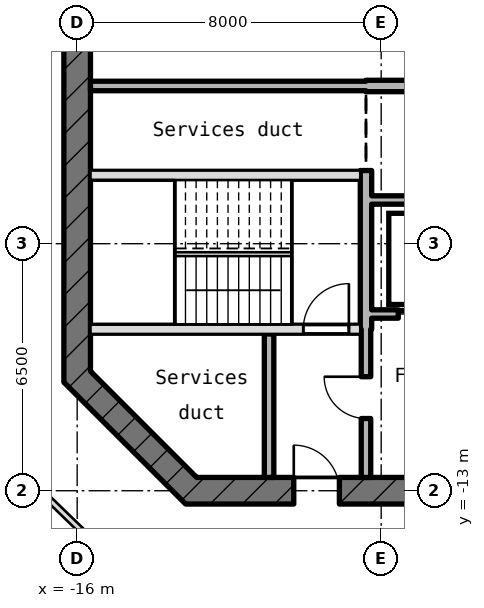
"""IFC4 building model, lengths in metres.
Left out: names, types, materials, properties, quantities, classifications, styles, units other than length and angle.
Written with IfcOpenShell. Run it as: python <this file> out.ifc"""

import sys

from ifc_helpers import new_model, si_unit, direction, frame, frame_2d, origin, place, context, subcontext, project, spatial, rectangle, extrude, element, fill, save


model = new_model("IFC4")
c1 = context("Model", 3, precision=1e-05, world=origin(), true_north=direction((0.0, 1.0)))
c2 = subcontext(c1, "Body", "Model", "MODEL_VIEW")
j1 = project(units=[si_unit("LENGTHUNIT", "METRE"), si_unit("PLANEANGLEUNIT", "RADIAN")], contexts=[c1])
p1 = place(None, origin())
s1 = spatial("IfcSite", under=j1, at=p1, CompositionType="ELEMENT")
p2 = place(p1, origin())
s2 = spatial("IfcBuilding", under=s1, at=p2, CompositionType="ELEMENT")
p3 = place(p2, frame((0.0, 0.0, 346.75)))
s3 = spatial("IfcBuildingStorey", under=s2, at=p3, CompositionType="ELEMENT", Elevation=346.75)
p4 = place(p3, frame((-16.0, 10.145, -0.18), z_axis=(0.0, 0.0, 1.0), x_axis=(0.0, -1.0, 0.0)))
e1 = element("IfcWall", 1, at=p4, inside=s3, PredefinedType="SHEAR", context=c2, shape_type="SweptSolid", body=[
    extrude(rectangle(XDim=20.29, YDim=0.7, at=frame_2d((10.145, 0.0))), origin(), (0.0, 0.0, 1.0), 4.15),
])
p5 = place(p4, frame((8.945, 0.0, 0.18)))
e2 = element("IfcOpeningElement", 2, at=p5, cuts=e1, PredefinedType="OPENING", context=c2, shape_type="SweptSolid", body=[
    extrude(rectangle(XDim=2.4, YDim=2.1, at=frame_2d((1.2, 1.05))), frame((0.0, 0.36, 0.0), z_axis=(0.0, -1.0, 0.0), x_axis=(1.0, 0.0, 0.0)), (0.0, 0.0, 1.0), 0.72),
])
p6 = place(p4, frame((5.545, 0.0, 0.18)))
e3 = element("IfcOpeningElement", 3, at=p6, cuts=e1, PredefinedType="OPENING", context=c2, shape_type="SweptSolid", body=[
    extrude(rectangle(XDim=1.2, YDim=2.1, at=frame_2d((0.6, 1.05))), frame((0.0, 0.36, 0.0), z_axis=(0.0, -1.0, 0.0), x_axis=(1.0, 0.0, 0.0)), (0.0, 0.0, 1.0), 0.72),
])
p7 = place(p3, frame((-16.103, -9.897, -0.18), z_axis=(0.0, 0.0, 1.0), x_axis=(0.707106781187, -0.707106781187, 0.0)))
e4 = element("IfcWall", 4, at=p7, inside=s3, PredefinedType="SHEAR", context=c2, shape_type="SweptSolid", body=[
    extrude(rectangle(XDim=4.533, YDim=0.7, at=frame_2d((2.266, 0.0))), origin(), (0.0, 0.0, 1.0), 4.15),
])
p8 = place(p3, frame((-13.145, -13.0, -0.18), z_axis=(0.0, 0.0, 1.0), x_axis=(1.0, 0.0, 0.0)))
e5 = element("IfcWall", 5, at=p8, inside=s3, PredefinedType="SHEAR", context=c2, shape_type="SweptSolid", body=[
    extrude(rectangle(XDim=26.29, YDim=0.7, at=frame_2d((13.145, 0.0))), origin(), (0.0, 0.0, 1.0), 4.15),
])
p9 = place(p8, frame((2.845, 0.0, 0.18)))
e6 = element("IfcOpeningElement", 6, at=p9, cuts=e5, PredefinedType="OPENING", context=c2, shape_type="SweptSolid", body=[
    extrude(rectangle(XDim=1.2, YDim=2.1, at=frame_2d((0.6, 1.05))), frame((0.0, 0.36, 0.0), z_axis=(0.0, -1.0, 0.0), x_axis=(1.0, 0.0, 0.0)), (0.0, 0.0, 1.0), 0.72),
])
p10 = place(p8, frame((6.845, 0.0, 0.18)))
e7 = element("IfcOpeningElement", 7, at=p10, cuts=e5, PredefinedType="OPENING", context=c2, shape_type="SweptSolid", body=[
    extrude(rectangle(XDim=1.4, YDim=2.1, at=frame_2d((0.7, 1.05))), frame((0.0, 0.36, 0.0), z_axis=(0.0, -1.0, 0.0), x_axis=(1.0, 0.0, 0.0)), (0.0, 0.0, 1.0), 0.72),
])
p11 = place(p8, frame((15.445, 0.0, 0.18)))
e8 = element("IfcOpeningElement", 8, at=p11, cuts=e5, PredefinedType="OPENING", context=c2, shape_type="SweptSolid", body=[
    extrude(rectangle(XDim=1.4, YDim=2.1, at=frame_2d((0.7, 1.05))), frame((0.0, 0.36, 0.0), z_axis=(0.0, -1.0, 0.0), x_axis=(1.0, 0.0, 0.0)), (0.0, 0.0, 1.0), 0.72),
])
p12 = place(p3, frame((-15.65, -8.75, -0.18), z_axis=(0.0, 0.0, 1.0), x_axis=(1.0, 0.0, 0.0)))
e9 = element("IfcWall", 9, at=p12, inside=s3, PredefinedType="SHEAR", context=c2, shape_type="SweptSolid", body=[
    extrude(rectangle(XDim=7.1, YDim=0.25, at=frame_2d((3.55, 0.0))), origin(), (0.0, 0.0, 1.0), 4.15),
])
p13 = place(p12, frame((5.6, 0.0, 0.18)))
e10 = element("IfcOpeningElement", 10, at=p13, cuts=e9, PredefinedType="OPENING", context=c2, shape_type="SweptSolid", body=[
    extrude(rectangle(XDim=1.2, YDim=2.1, at=frame_2d((0.6, 1.05))), frame((0.0, 0.135, 0.0), z_axis=(0.0, -1.0, 0.0), x_axis=(1.0, 0.0, 0.0)), (0.0, 0.0, 1.0), 0.27),
])
p14 = place(p3, frame((-8.25, -8.35, 0.0), z_axis=(0.0, 0.0, 1.0), x_axis=(1.0, 0.0, 0.0)))
e11 = element("IfcWall", 11, at=p14, inside=s3, PredefinedType="STANDARD", context=c2, shape_type="SweptSolid", body=[
    extrude(rectangle(XDim=5.34, YDim=0.22, at=frame_2d((2.67, 0.0))), origin(), (0.0, 0.0, 1.0), 3.97),
])
p15 = place(p14, frame((0.7, 0.0, 0.0)))
e12 = element("IfcOpeningElement", 12, at=p15, cuts=e11, PredefinedType="OPENING", context=c2, shape_type="SweptSolid", body=[
    extrude(rectangle(XDim=1.1, YDim=2.1, at=frame_2d((0.55, 1.05))), frame((0.0, 0.12, 0.0), z_axis=(0.0, -1.0, 0.0), x_axis=(1.0, 0.0, 0.0)), (0.0, 0.0, 1.0), 0.24),
])
p16 = place(p14, frame((3.5, 0.0, 0.0)))
e13 = element("IfcOpeningElement", 13, at=p16, cuts=e11, PredefinedType="OPENING", context=c2, shape_type="SweptSolid", body=[
    extrude(rectangle(XDim=1.1, YDim=2.1, at=frame_2d((0.55, 1.05))), frame((0.0, 0.12, 0.0), z_axis=(0.0, -1.0, 0.0), x_axis=(1.0, 0.0, 0.0)), (0.0, 0.0, 1.0), 0.24),
])
p17 = place(p3, frame((-8.25, -5.35, 0.0), z_axis=(0.0, 0.0, 1.0), x_axis=(1.0, 0.0, 0.0)))
e14 = element("IfcWall", 14, at=p17, inside=s3, PredefinedType="STANDARD", context=c2, shape_type="SweptSolid", body=[
    extrude(rectangle(XDim=16.5, YDim=0.22, at=frame_2d((8.25, 0.0))), origin(), (0.0, 0.0, 1.0), 3.97),
])
p18 = place(p3, frame((-15.65, -4.7, -0.18), z_axis=(0.0, 0.0, 1.0), x_axis=(1.0, 0.0, 0.0)))
e15 = element("IfcWall", 15, at=p18, inside=s3, PredefinedType="SHEAR", context=c2, shape_type="SweptSolid", body=[
    extrude(rectangle(XDim=7.1, YDim=0.25, at=frame_2d((3.55, 0.0))), origin(), (0.0, 0.0, 1.0), 4.15),
])
p19 = place(p3, frame((-15.65, -2.35, 0.0), z_axis=(0.0, 0.0, 1.0), x_axis=(1.0, 0.0, 0.0)))
e16 = element("IfcWall", 16, at=p19, inside=s3, PredefinedType="STANDARD", context=c2, shape_type="SweptSolid", body=[
    extrude(rectangle(XDim=7.25, YDim=0.25, at=frame_2d((3.625, 0.0))), origin(), (0.0, 0.0, 1.0), 3.97),
])
p20 = place(p3, frame((-8.4, -2.35, -0.18), z_axis=(0.0, 0.0, 1.0), x_axis=(1.0, 0.0, 0.0)))
e17 = element("IfcWall", 17, at=p20, inside=s3, PredefinedType="SHEAR", context=c2, shape_type="SweptSolid", body=[
    extrude(rectangle(XDim=16.8, YDim=0.3, at=frame_2d((8.4, 0.0))), origin(), (0.0, 0.0, 1.0), 4.15),
])
p21 = place(p20, frame((2.2, 0.0, 0.18)))
e18 = element("IfcOpeningElement", 18, at=p21, cuts=e17, PredefinedType="OPENING", context=c2, shape_type="SweptSolid", body=[
    extrude(rectangle(XDim=1.2, YDim=2.1, at=frame_2d((0.6, 1.05))), frame((0.0, 0.16, 0.0), z_axis=(0.0, -1.0, 0.0), x_axis=(1.0, 0.0, 0.0)), (0.0, 0.0, 1.0), 0.32),
])
p22 = place(p20, frame((5.0, 0.0, 0.18)))
e19 = element("IfcOpeningElement", 19, at=p22, cuts=e17, PredefinedType="OPENING", context=c2, shape_type="SweptSolid", body=[
    extrude(rectangle(XDim=1.2, YDim=2.1, at=frame_2d((0.6, 1.05))), frame((0.0, 0.16, 0.0), z_axis=(0.0, -1.0, 0.0), x_axis=(1.0, 0.0, 0.0)), (0.0, 0.0, 1.0), 0.32),
])
p23 = place(p20, frame((7.8, 0.0, 0.18)))
e20 = element("IfcOpeningElement", 20, at=p23, cuts=e17, PredefinedType="OPENING", context=c2, shape_type="SweptSolid", body=[
    extrude(rectangle(XDim=1.2, YDim=2.1, at=frame_2d((0.6, 1.05))), frame((0.0, 0.16, 0.0), z_axis=(0.0, -1.0, 0.0), x_axis=(1.0, 0.0, 0.0)), (0.0, 0.0, 1.0), 0.32),
])
p24 = place(p20, frame((10.6, 0.0, 0.18)))
e21 = element("IfcOpeningElement", 21, at=p24, cuts=e17, PredefinedType="OPENING", context=c2, shape_type="SweptSolid", body=[
    extrude(rectangle(XDim=1.2, YDim=2.1, at=frame_2d((0.6, 1.05))), frame((0.0, 0.16, 0.0), z_axis=(0.0, -1.0, 0.0), x_axis=(1.0, 0.0, 0.0)), (0.0, 0.0, 1.0), 0.32),
])
p25 = place(p20, frame((13.4, 0.0, 0.18)))
e22 = element("IfcOpeningElement", 22, at=p25, cuts=e17, PredefinedType="OPENING", context=c2, shape_type="SweptSolid", body=[
    extrude(rectangle(XDim=1.2, YDim=2.1, at=frame_2d((0.6, 1.05))), frame((0.0, 0.16, 0.0), z_axis=(0.0, -1.0, 0.0), x_axis=(1.0, 0.0, 0.0)), (0.0, 0.0, 1.0), 0.32),
])
p26 = place(p3, frame((-10.95, -12.65, 0.0), z_axis=(0.0, 0.0, 1.0), x_axis=(0.0, 1.0, 0.0)))
e23 = element("IfcWall", 23, at=p26, inside=s3, PredefinedType="STANDARD", context=c2, shape_type="SweptSolid", body=[
    extrude(rectangle(XDim=3.775, YDim=0.25, at=frame_2d((1.887, 0.0))), origin(), (0.0, 0.0, 1.0), 3.97),
])
p27 = place(p3, frame((-8.4, -12.65, 0.0), z_axis=(0.0, 0.0, 1.0), x_axis=(0.0, 1.0, 0.0)))
e24 = element("IfcWall", 24, at=p27, inside=s3, PredefinedType="STANDARD", context=c2, shape_type="SweptSolid", body=[
    extrude(rectangle(XDim=3.9, YDim=0.25, at=frame_2d((1.95, 0.0))), origin(), (0.0, 0.0, 1.0), 3.97),
])
p28 = place(p27, frame((1.55, 0.0, 0.0)))
e25 = element("IfcOpeningElement", 25, at=p28, cuts=e24, PredefinedType="OPENING", context=c2, shape_type="SweptSolid", body=[
    extrude(rectangle(XDim=1.1, YDim=2.1, at=frame_2d((0.55, 1.05))), frame((0.0, 0.135, 0.0), z_axis=(0.0, -1.0, 0.0), x_axis=(1.0, 0.0, 0.0)), (0.0, 0.0, 1.0), 0.27),
])
p29 = place(p3, frame((-8.4, -8.75, -0.18), z_axis=(0.0, 0.0, 1.0), x_axis=(0.0, 1.0, 0.0)))
e26 = element("IfcWall", 26, at=p29, inside=s3, PredefinedType="SHEAR", context=c2, shape_type="SweptSolid", body=[
    extrude(rectangle(XDim=4.175, YDim=0.3, at=frame_2d((2.087, 0.0))), origin(), (0.0, 0.0, 1.0), 4.15),
])
p30 = place(p3, frame((-14.707, -15.195, 0.0), z_axis=(0.0, 0.0, 1.0), x_axis=(-0.718211802801, 0.695824551391, 0.0)))
e27 = element("IfcWall", 27, at=p30, inside=s3, PredefinedType="PARTITIONING", context=c2, shape_type="SweptSolid", body=[
    extrude(rectangle(XDim=5.769, YDim=0.15, at=frame_2d((2.885, 0.0))), origin(), (0.0, 0.0, 1.0), 3.97),
])
p31 = place(p15, origin())
e28 = element("IfcDoor", 28, at=p31, inside=s3, OperationType="DOUBLE_DOOR_SLIDING", PredefinedType="DOOR", context=c2, shape_type="SweptSolid", body=[
    extrude(rectangle(XDim=1.1, YDim=2.1, at=frame_2d((0.55, 1.05))), frame((0.0, 0.025, 0.0), z_axis=(0.0, -1.0, 0.0), x_axis=(1.0, 0.0, 0.0)), (0.0, 0.0, 1.0), 0.05),
])
fill(e12, e28)
p32 = place(p13, origin())
e29 = element("IfcDoor", 29, at=p32, inside=s3, OperationType="SINGLE_SWING_RIGHT", PredefinedType="DOOR", context=c2, shape_type="SweptSolid", body=[
    extrude(rectangle(XDim=1.2, YDim=2.1, at=frame_2d((0.6, 1.05))), frame((0.0, 0.025, 0.0), z_axis=(0.0, -1.0, 0.0), x_axis=(1.0, 0.0, 0.0)), (0.0, 0.0, 1.0), 0.05),
])
fill(e10, e29)
p33 = place(p28, origin())
e30 = element("IfcDoor", 30, at=p33, inside=s3, OperationType="SINGLE_SWING_RIGHT", PredefinedType="DOOR", context=c2, shape_type="SweptSolid", body=[
    extrude(rectangle(XDim=1.1, YDim=2.1, at=frame_2d((0.55, 1.05))), frame((0.0, 0.025, 0.0), z_axis=(0.0, -1.0, 0.0), x_axis=(1.0, 0.0, 0.0)), (0.0, 0.0, 1.0), 0.05),
])
fill(e25, e30)
p34 = place(p9, origin())
e31 = element("IfcDoor", 31, at=p34, inside=s3, OperationType="SINGLE_SWING_RIGHT", PredefinedType="DOOR", context=c2, shape_type="SweptSolid", body=[
    extrude(rectangle(XDim=1.2, YDim=2.1, at=frame_2d((0.6, 1.05))), frame((0.0, 0.025, 0.0), z_axis=(0.0, -1.0, 0.0), x_axis=(1.0, 0.0, 0.0)), (0.0, 0.0, 1.0), 0.05),
])
fill(e6, e31)
save(model, sys.argv[1])
